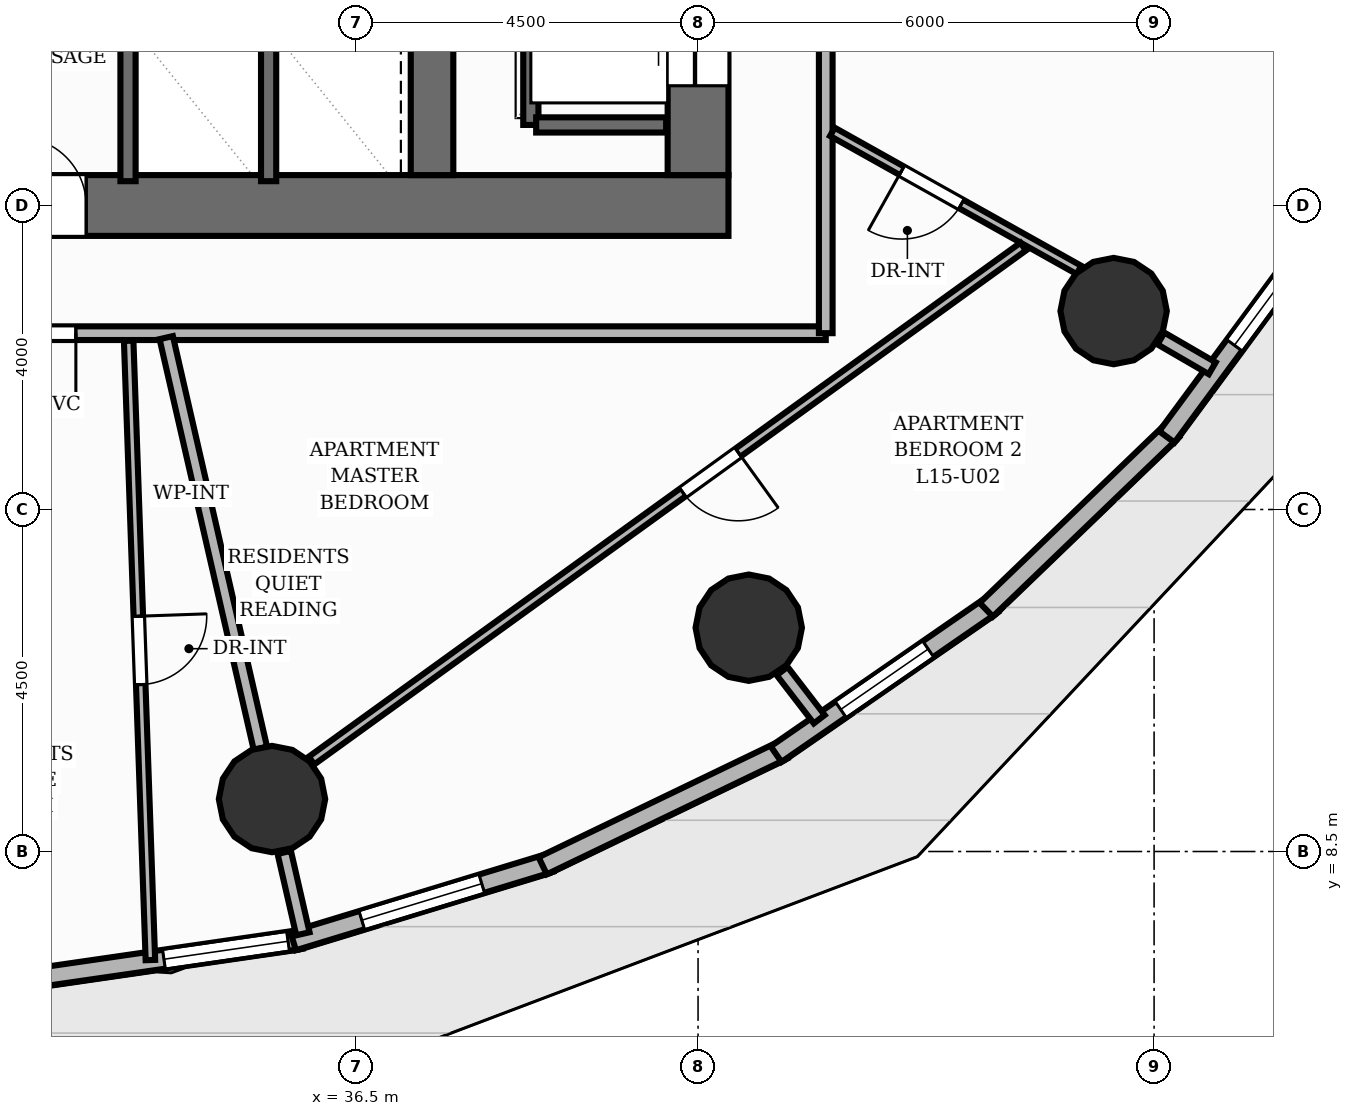
"""IFC4 building model, lengths in metres.
Left out: names, types, materials, properties, quantities, classifications, styles, units other than length and angle.
Written with IfcOpenShell. Run it as: python <this file> out.ifc"""

import sys

from ifc_helpers import new_model, si_unit, direction, frame, frame_2d, origin, origin_2d, place, context, subcontext, project, spatial, rectangle, circle, extrude, element, fill, save


model = new_model("IFC4")
c1 = context("Model", 3, precision=1e-05, world=origin(), true_north=direction((0.0, 1.0)))
c2 = subcontext(c1, "Body", "Model", "MODEL_VIEW")
j1 = project(units=[si_unit("LENGTHUNIT", "METRE"), si_unit("PLANEANGLEUNIT", "RADIAN")], contexts=[c1])
p1 = place(None, origin())
s1 = spatial("IfcSite", under=j1, at=p1, CompositionType="ELEMENT")
p2 = place(p1, origin())
s2 = spatial("IfcBuilding", under=s1, at=p2, CompositionType="ELEMENT")
p3 = place(p2, frame((0.0, 0.0, 53.6)))
s3 = spatial("IfcBuildingStorey", under=s2, at=p3, CompositionType="ELEMENT", Elevation=53.6)
p4 = place(p3, frame((22.6, 17.0, 0.0), z_axis=(0.0, 0.0, 1.0), x_axis=(1.0, 0.0, 0.0)))
e1 = element("IfcWall", 1, at=p4, inside=s3, PredefinedType="SHEAR", context=c2, shape_type="SweptSolid", body=[
    extrude(rectangle(XDim=18.8, YDim=0.8, at=frame_2d((9.4, 0.0))), origin(), (0.0, 0.0, 1.0), 3.2),
])
p5 = place(p4, frame((5.9, 0.0, 0.0)))
e2 = element("IfcOpeningElement", 2, at=p5, cuts=e1, PredefinedType="OPENING", context=c2, shape_type="SweptSolid", body=[
    extrude(rectangle(XDim=1.1, YDim=2.15, at=frame_2d((0.55, 1.075))), frame((0.0, 0.41, 0.0), z_axis=(0.0, -1.0, 0.0), x_axis=(1.0, 0.0, 0.0)), (0.0, 0.0, 1.0), 0.82),
])
p6 = place(p4, frame((9.45, 0.0, 0.0)))
e3 = element("IfcOpeningElement", 3, at=p6, cuts=e1, PredefinedType="OPENING", context=c2, shape_type="SweptSolid", body=[
    extrude(rectangle(XDim=0.9, YDim=2.1, at=frame_2d((0.45, 1.05))), frame((0.0, 0.41, 0.0), z_axis=(0.0, -1.0, 0.0), x_axis=(1.0, 0.0, 0.0)), (0.0, 0.0, 1.0), 0.82),
])
p7 = place(p3, frame((41.0, 17.4, 0.0), z_axis=(0.0, 0.0, 1.0), x_axis=(0.0, 1.0, 0.0)))
e4 = element("IfcWall", 4, at=p7, inside=s3, PredefinedType="SHEAR", context=c2, shape_type="SweptSolid", body=[
    extrude(rectangle(XDim=13.2, YDim=0.8, at=frame_2d((6.6, 0.0))), origin(), (0.0, 0.0, 1.0), 3.2),
])
p8 = place(p7, frame((1.175, 0.0, 0.0)))
e5 = element("IfcOpeningElement", 5, at=p8, cuts=e4, PredefinedType="OPENING", context=c2, shape_type="SweptSolid", body=[
    extrude(rectangle(XDim=1.05, YDim=2.15, at=frame_2d((0.525, 1.075))), frame((0.0, 0.41, 0.0), z_axis=(0.0, -1.0, 0.0), x_axis=(1.0, 0.0, 0.0)), (0.0, 0.0, 1.0), 0.82),
])
p9 = place(p7, frame((4.425, 0.0, 0.0)))
e6 = element("IfcOpeningElement", 6, at=p9, cuts=e4, PredefinedType="OPENING", context=c2, shape_type="SweptSolid", body=[
    extrude(rectangle(XDim=1.05, YDim=2.15, at=frame_2d((0.525, 1.075))), frame((0.0, 0.41, 0.0), z_axis=(0.0, -1.0, 0.0), x_axis=(1.0, 0.0, 0.0)), (0.0, 0.0, 1.0), 0.82),
])
p10 = place(p7, frame((7.725, 0.0, 0.0)))
e7 = element("IfcOpeningElement", 7, at=p10, cuts=e4, PredefinedType="OPENING", context=c2, shape_type="SweptSolid", body=[
    extrude(rectangle(XDim=1.05, YDim=2.15, at=frame_2d((0.525, 1.075))), frame((0.0, 0.41, 0.0), z_axis=(0.0, -1.0, 0.0), x_axis=(1.0, 0.0, 0.0)), (0.0, 0.0, 1.0), 0.82),
])
p11 = place(p7, frame((10.975, 0.0, 0.0)))
e8 = element("IfcOpeningElement", 8, at=p11, cuts=e4, PredefinedType="OPENING", context=c2, shape_type="SweptSolid", body=[
    extrude(rectangle(XDim=1.05, YDim=2.15, at=frame_2d((0.525, 1.075))), frame((0.0, 0.41, 0.0), z_axis=(0.0, -1.0, 0.0), x_axis=(1.0, 0.0, 0.0)), (0.0, 0.0, 1.0), 0.82),
])
p12 = place(p3, frame((37.5, 17.4, 0.0), z_axis=(0.0, 0.0, 1.0), x_axis=(0.0, 1.0, 0.0)))
e9 = element("IfcWall", 9, at=p12, inside=s3, PredefinedType="SHEAR", context=c2, shape_type="SweptSolid", body=[
    extrude(rectangle(XDim=13.2, YDim=0.56, at=frame_2d((6.6, 0.0))), origin(), (0.0, 0.0, 1.0), 3.2),
])
for number, where, z_axis, x_axis in (
    (10, (35.395, 9.19, 0.0), (0.0, 0.0, 1.0), (1.0, 0.0, 0.0)),
    (11, (41.667, 11.445, 0.0), (0.0, 0.0, 1.0), (1.0, 0.0, 0.0)),
    (12, (46.468, 15.611, 0.0), (0.0, 0.0, 1.0), (1.0, 0.0, 0.0)),
):
    element("IfcColumn", number, at=place(p3, frame(where, z_axis=z_axis, x_axis=x_axis)), inside=s3, PredefinedType="COLUMN", context=c2, shape_type="SweptSolid", body=[
        extrude(circle(Radius=0.7, at=origin_2d()), origin(), (0.0, 0.0, 1.0), 3.2),
    ])
p13 = place(p3, frame((35.779, 7.344, 0.0), z_axis=(0.0, 0.0, 1.0), x_axis=(-0.989638017979, -0.143584795051, 0.0)))
e13 = element("IfcWall", 13, at=p13, inside=s3, PredefinedType="SOLIDWALL", context=c2, shape_type="SweptSolid", body=[
    extrude(rectangle(XDim=3.538, YDim=0.25, at=frame_2d((1.769, 0.0))), origin(), (0.0, 0.0, 1.0), 2.96),
])
p14 = place(p13, frame((0.175, 0.0, 0.85)))
e14 = element("IfcOpeningElement", 14, at=p14, cuts=e13, PredefinedType="OPENING", context=c2, shape_type="SweptSolid", body=[
    extrude(rectangle(XDim=1.65, YDim=1.29, at=frame_2d((0.825, 0.645))), frame((0.0, 0.135, 0.0), z_axis=(0.0, -1.0, 0.0), x_axis=(1.0, 0.0, 0.0)), (0.0, 0.0, 1.0), 0.27),
])
p15 = place(p3, frame((39.057, 8.352, 0.0), z_axis=(0.0, 0.0, 1.0), x_axis=(-0.95658107252, -0.291466381759, 0.0)))
e15 = element("IfcWall", 15, at=p15, inside=s3, PredefinedType="SOLIDWALL", context=c2, shape_type="SweptSolid", body=[
    extrude(rectangle(XDim=3.538, YDim=0.25, at=frame_2d((1.769, 0.0))), origin(), (0.0, 0.0, 1.0), 2.96),
])
p16 = place(p15, frame((0.944, 0.0, 0.85)))
e16 = element("IfcOpeningElement", 16, at=p16, cuts=e15, PredefinedType="OPENING", context=c2, shape_type="SweptSolid", body=[
    extrude(rectangle(XDim=1.65, YDim=1.55, at=frame_2d((0.825, 0.775))), frame((0.0, 0.135, 0.0), z_axis=(0.0, -1.0, 0.0), x_axis=(1.0, 0.0, 0.0)), (0.0, 0.0, 1.0), 0.27),
])
p17 = place(p3, frame((42.121, 9.836, 0.0), z_axis=(0.0, 0.0, 1.0), x_axis=(-0.901067057596, -0.433679787073, 0.0)))
e17 = element("IfcWall", 17, at=p17, inside=s3, PredefinedType="SOLIDWALL", context=c2, shape_type="SweptSolid", body=[
    extrude(rectangle(XDim=3.513, YDim=0.25, at=frame_2d((1.756, 0.0))), origin(), (0.0, 0.0, 1.0), 2.96),
])
p18 = place(p3, frame((44.877, 11.751, 0.0), z_axis=(0.0, 0.0, 1.0), x_axis=(-0.822610496702, -0.568605285515, 0.0)))
e18 = element("IfcWall", 18, at=p18, inside=s3, PredefinedType="SOLIDWALL", context=c2, shape_type="SweptSolid", body=[
    extrude(rectangle(XDim=3.465, YDim=0.25, at=frame_2d((1.732, 0.0))), origin(), (0.0, 0.0, 1.0), 2.96),
])
p19 = place(p18, frame((1.032, 0.0, 0.85)))
e19 = element("IfcOpeningElement", 19, at=p19, cuts=e18, PredefinedType="OPENING", context=c2, shape_type="SweptSolid", body=[
    extrude(rectangle(XDim=1.4, YDim=1.29, at=frame_2d((0.7, 0.645))), frame((0.0, 0.135, 0.0), z_axis=(0.0, -1.0, 0.0), x_axis=(1.0, 0.0, 0.0)), (0.0, 0.0, 1.0), 0.27),
])
p20 = place(p3, frame((47.24, 14.039, 0.0), z_axis=(0.0, 0.0, 1.0), x_axis=(-0.720340150583, -0.693620982568, 0.0)))
e20 = element("IfcWall", 20, at=p20, inside=s3, PredefinedType="SOLIDWALL", context=c2, shape_type="SweptSolid", body=[
    extrude(rectangle(XDim=3.399, YDim=0.25, at=frame_2d((1.7, 0.0))), origin(), (0.0, 0.0, 1.0), 2.96),
])
p21 = place(p3, frame((49.14, 16.629, 0.0), z_axis=(0.0, 0.0, 1.0), x_axis=(-0.593762827217, -0.804640109003, 0.0)))
e21 = element("IfcWall", 21, at=p21, inside=s3, PredefinedType="SOLIDWALL", context=c2, shape_type="SweptSolid", body=[
    extrude(rectangle(XDim=3.323, YDim=0.25, at=frame_2d((1.661, 0.0))), origin(), (0.0, 0.0, 1.0), 2.96),
])
p22 = place(p21, frame((0.175, 0.0, 0.85)))
e22 = element("IfcOpeningElement", 22, at=p22, cuts=e21, PredefinedType="OPENING", context=c2, shape_type="SweptSolid", body=[
    extrude(rectangle(XDim=1.65, YDim=1.55, at=frame_2d((0.825, 0.775))), frame((0.0, 0.135, 0.0), z_axis=(0.0, -1.0, 0.0), x_axis=(1.0, 0.0, 0.0)), (0.0, 0.0, 1.0), 0.27),
])
p23 = place(p3, frame((38.8, 18.06, 0.0), z_axis=(0.0, 0.0, 1.0), x_axis=(0.0, 1.0, 0.0)))
e23 = element("IfcWall", 23, at=p23, inside=s3, PredefinedType="SHEAR", context=c2, shape_type="SweptSolid", body=[
    extrude(rectangle(XDim=11.88, YDim=0.2, at=frame_2d((5.94, 0.0))), origin(), (0.0, 0.0, 1.0), 3.2),
])
p24 = place(p3, frame((38.87, 18.06, 0.0), z_axis=(0.0, 0.0, 1.0), x_axis=(1.0, 0.0, 0.0)))
e24 = element("IfcWall", 24, at=p24, inside=s3, PredefinedType="SHEAR", context=c2, shape_type="SweptSolid", body=[
    extrude(rectangle(XDim=1.71, YDim=0.2, at=frame_2d((0.855, 0.0))), origin(), (0.0, 0.0, 1.0), 3.2),
])
for number, where, z_axis, x_axis in (
    (25, (33.5, 17.32, 0.0), (0.0, 0.0, 1.0), (0.0, 1.0, 0.0)),
    (26, (35.35, 17.32, 0.0), (0.0, 0.0, 1.0), (0.0, 1.0, 0.0)),
):
    element("IfcWall", number, at=place(p3, frame(where, z_axis=z_axis, x_axis=x_axis)), inside=s3, PredefinedType="SHEAR", context=c2, shape_type="SweptSolid", body=[
        extrude(rectangle(XDim=1.86, YDim=0.2, at=frame_2d((0.93, 0.0))), origin(), (0.0, 0.0, 1.0), 3.2),
    ])
p25 = place(p3, frame((35.555, 8.488, 0.0), z_axis=(0.0, 0.0, 1.0), x_axis=(0.223512485262, -0.974701066446, 0.0)))
e27 = element("IfcWall", 27, at=p25, inside=s3, PredefinedType="PARTITIONING", context=c2, shape_type="SweptSolid", body=[
    extrude(rectangle(XDim=1.099, YDim=0.18, at=frame_2d((0.549, 0.0))), origin(), (0.0, 0.0, 1.0), 2.178),
])
p26 = place(p3, frame((42.106, 10.874, 0.0), z_axis=(0.0, 0.0, 1.0), x_axis=(0.609961416057, -0.792431114307, 0.0)))
e28 = element("IfcWall", 28, at=p26, inside=s3, PredefinedType="PARTITIONING", context=c2, shape_type="SweptSolid", body=[
    extrude(rectangle(XDim=0.8, YDim=0.18, at=frame_2d((0.4, 0.0))), origin(), (0.0, 0.0, 1.0), 2.178),
])
p27 = place(p3, frame((47.091, 15.25, 0.0), z_axis=(0.0, 0.0, 1.0), x_axis=(0.86504748832, -0.501689986895, 0.0)))
e29 = element("IfcWall", 29, at=p27, inside=s3, PredefinedType="PARTITIONING", context=c2, shape_type="SweptSolid", body=[
    extrude(rectangle(XDim=0.78, YDim=0.18, at=frame_2d((0.39, 0.0))), origin(), (0.0, 0.0, 1.0), 2.178),
])
p28 = place(p3, frame((42.68, 15.32, 0.0), z_axis=(0.0, 0.0, 1.0), x_axis=(-1.0, 0.0, 0.0)))
e30 = element("IfcWall", 30, at=p28, inside=s3, PredefinedType="PARTITIONING", context=c2, shape_type="SweptSolid", body=[
    extrude(rectangle(XDim=13.87, YDim=0.18, at=frame_2d((6.935, 0.0))), origin(), (0.0, 0.0, 1.0), 2.955),
])
p29 = place(p28, frame((9.866, 0.0, 0.0)))
e31 = element("IfcOpeningElement", 31, at=p29, cuts=e30, PredefinedType="OPENING", context=c2, shape_type="SweptSolid", body=[
    extrude(rectangle(XDim=0.9, YDim=2.1, at=frame_2d((0.45, 1.05))), frame((0.0, 0.1, 0.0), z_axis=(0.0, -1.0, 0.0), x_axis=(1.0, 0.0, 0.0)), (0.0, 0.0, 1.0), 0.2),
])
p30 = place(p3, frame((42.68, 30.109, 0.0), z_axis=(0.0, 0.0, 1.0), x_axis=(0.0, -1.0, 0.0)))
e32 = element("IfcWall", 32, at=p30, inside=s3, PredefinedType="PARTITIONING", context=c2, shape_type="SweptSolid", body=[
    extrude(rectangle(XDim=14.789, YDim=0.18, at=frame_2d((7.395, 0.0))), origin(), (0.0, 0.0, 1.0), 2.955),
])
p31 = place(p30, frame((9.4, 0.0, 0.0)))
e33 = element("IfcOpeningElement", 33, at=p31, cuts=e32, PredefinedType="OPENING", context=c2, shape_type="SweptSolid", body=[
    extrude(rectangle(XDim=1.05, YDim=2.15, at=frame_2d((0.525, 1.075))), frame((0.0, 0.1, 0.0), z_axis=(0.0, -1.0, 0.0), x_axis=(1.0, 0.0, 0.0)), (0.0, 0.0, 1.0), 0.2),
])
p32 = place(p3, frame((33.509, 15.22, 0.0), z_axis=(0.0, 0.0, 1.0), x_axis=(0.035033610305, -0.999386134659, 0.0)))
e34 = element("IfcWall", 34, at=p32, inside=s3, PredefinedType="PARTITIONING", context=c2, shape_type="SweptSolid", body=[
    extrude(rectangle(XDim=8.154, YDim=0.125, at=frame_2d((4.077, 0.0))), origin(), (0.0, 0.0, 1.0), 2.955),
])
p33 = place(p32, frame((3.627, 0.0, 0.0)))
e35 = element("IfcOpeningElement", 35, at=p33, cuts=e34, PredefinedType="OPENING", context=c2, shape_type="SweptSolid", body=[
    extrude(rectangle(XDim=0.9, YDim=2.1, at=frame_2d((0.45, 1.05))), frame((0.0, 0.073, 0.0), z_axis=(0.0, -1.0, 0.0), x_axis=(1.0, 0.0, 0.0)), (0.0, 0.0, 1.0), 0.145),
])
p34 = place(p3, frame((34.003, 15.261, 0.0), z_axis=(0.0, 0.0, 1.0), x_axis=(0.22340578764, -0.974725527546, 0.0)))
e36 = element("IfcWall", 36, at=p34, inside=s3, PredefinedType="PARTITIONING", context=c2, shape_type="SweptSolid", body=[
    extrude(rectangle(XDim=5.545, YDim=0.18, at=frame_2d((2.772, 0.0))), origin(), (0.0, 0.0, 1.0), 2.178),
])
p35 = place(p3, frame((46.011, 16.152, 0.0), z_axis=(0.0, 0.0, 1.0), x_axis=(-0.872501537555, 0.488611365978, 0.0)))
e37 = element("IfcWall", 37, at=p35, inside=s3, PredefinedType="PARTITIONING", context=c2, shape_type="SweptSolid", body=[
    extrude(rectangle(XDim=3.719, YDim=0.125, at=frame_2d((1.859, 0.0))), origin(), (0.0, 0.0, 1.0), 2.178),
])
p36 = place(p35, frame((1.773, 0.0, 0.0)))
e38 = element("IfcOpeningElement", 38, at=p36, cuts=e37, PredefinedType="OPENING", context=c2, shape_type="SweptSolid", body=[
    extrude(rectangle(XDim=0.9, YDim=2.1, at=frame_2d((0.45, 1.05))), frame((0.0, 0.073, 0.0), z_axis=(0.0, -1.0, 0.0), x_axis=(1.0, 0.0, 0.0)), (0.0, 0.0, 1.0), 0.145),
])
p37 = place(p3, frame((45.278, 16.459, 0.0), z_axis=(0.0, 0.0, 1.0), x_axis=(-0.810668637761, -0.585505217526, 0.0)))
e39 = element("IfcWall", 39, at=p37, inside=s3, PredefinedType="PARTITIONING", context=c2, shape_type="SweptSolid", body=[
    extrude(rectangle(XDim=11.55, YDim=0.125, at=frame_2d((5.775, 0.0))), origin(), (0.0, 0.0, 1.0), 2.955),
])
p38 = place(p37, frame((4.625, 0.0, 0.0)))
e40 = element("IfcOpeningElement", 40, at=p38, cuts=e39, PredefinedType="OPENING", context=c2, shape_type="SweptSolid", body=[
    extrude(rectangle(XDim=0.9, YDim=2.1, at=frame_2d((0.45, 1.05))), frame((0.0, 0.073, 0.0), z_axis=(0.0, -1.0, 0.0), x_axis=(1.0, 0.0, 0.0)), (0.0, 0.0, 1.0), 0.145),
])
p39 = place(p14, origin())
e41 = element("IfcWindow", 41, at=p39, inside=s3, PartitioningType="SINGLE_PANEL", PredefinedType="WINDOW", context=c2, shape_type="SweptSolid", body=[
    extrude(rectangle(XDim=1.65, YDim=1.29, at=frame_2d((0.825, 0.645))), frame((0.0, 0.03, 0.0), z_axis=(0.0, -1.0, 0.0), x_axis=(1.0, 0.0, 0.0)), (0.0, 0.0, 1.0), 0.06),
])
fill(e14, e41)
p40 = place(p16, origin())
e42 = element("IfcWindow", 42, at=p40, inside=s3, PartitioningType="SINGLE_PANEL", PredefinedType="WINDOW", context=c2, shape_type="SweptSolid", body=[
    extrude(rectangle(XDim=1.65, YDim=1.55, at=frame_2d((0.825, 0.775))), frame((0.0, 0.03, 0.0), z_axis=(0.0, -1.0, 0.0), x_axis=(1.0, 0.0, 0.0)), (0.0, 0.0, 1.0), 0.06),
])
fill(e16, e42)
p41 = place(p19, origin())
e43 = element("IfcWindow", 43, at=p41, inside=s3, PartitioningType="SINGLE_PANEL", PredefinedType="WINDOW", context=c2, shape_type="SweptSolid", body=[
    extrude(rectangle(XDim=1.4, YDim=1.29, at=frame_2d((0.7, 0.645))), frame((0.0, 0.03, 0.0), z_axis=(0.0, -1.0, 0.0), x_axis=(1.0, 0.0, 0.0)), (0.0, 0.0, 1.0), 0.06),
])
fill(e19, e43)
p42 = place(p22, origin())
e44 = element("IfcWindow", 44, at=p42, inside=s3, PartitioningType="SINGLE_PANEL", PredefinedType="WINDOW", context=c2, shape_type="SweptSolid", body=[
    extrude(rectangle(XDim=1.65, YDim=1.55, at=frame_2d((0.825, 0.775))), frame((0.0, 0.03, 0.0), z_axis=(0.0, -1.0, 0.0), x_axis=(1.0, 0.0, 0.0)), (0.0, 0.0, 1.0), 0.06),
])
fill(e22, e44)
p43 = place(p8, origin())
e45 = element("IfcDoor", 45, at=p43, inside=s3, OperationType="DOUBLE_DOOR_SLIDING", PredefinedType="DOOR", context=c2, shape_type="SweptSolid", body=[
    extrude(rectangle(XDim=1.05, YDim=2.15, at=frame_2d((0.525, 1.075))), frame((0.0, 0.025, 0.0), z_axis=(0.0, -1.0, 0.0), x_axis=(1.0, 0.0, 0.0)), (0.0, 0.0, 1.0), 0.05),
])
fill(e5, e45)
p44 = place(p6, origin())
e46 = element("IfcDoor", 46, at=p44, inside=s3, OperationType="SINGLE_SWING_LEFT", PredefinedType="DOOR", context=c2, shape_type="SweptSolid", body=[
    extrude(rectangle(XDim=0.9, YDim=2.1, at=frame_2d((0.45, 1.05))), frame((0.0, 0.025, 0.0), z_axis=(0.0, -1.0, 0.0), x_axis=(1.0, 0.0, 0.0)), (0.0, 0.0, 1.0), 0.05),
])
fill(e3, e46)
p45 = place(p29, origin())
e47 = element("IfcDoor", 47, at=p45, inside=s3, OperationType="SINGLE_SWING_LEFT", PredefinedType="DOOR", context=c2, shape_type="SweptSolid", body=[
    extrude(rectangle(XDim=0.9, YDim=2.1, at=frame_2d((0.45, 1.05))), frame((0.0, 0.025, 0.0), z_axis=(0.0, -1.0, 0.0), x_axis=(1.0, 0.0, 0.0)), (0.0, 0.0, 1.0), 0.05),
])
fill(e31, e47)
p46 = place(p33, origin())
e48 = element("IfcDoor", 48, at=p46, inside=s3, OperationType="SINGLE_SWING_LEFT", PredefinedType="DOOR", context=c2, shape_type="SweptSolid", body=[
    extrude(rectangle(XDim=0.9, YDim=2.1, at=frame_2d((0.45, 1.05))), frame((0.0, 0.025, 0.0), z_axis=(0.0, -1.0, 0.0), x_axis=(1.0, 0.0, 0.0)), (0.0, 0.0, 1.0), 0.05),
])
fill(e35, e48)
p47 = place(p36, origin())
e49 = element("IfcDoor", 49, at=p47, inside=s3, OperationType="SINGLE_SWING_RIGHT", PredefinedType="DOOR", context=c2, shape_type="SweptSolid", body=[
    extrude(rectangle(XDim=0.9, YDim=2.1, at=frame_2d((0.45, 1.05))), frame((0.0, 0.025, 0.0), z_axis=(0.0, -1.0, 0.0), x_axis=(1.0, 0.0, 0.0)), (0.0, 0.0, 1.0), 0.05),
])
fill(e38, e49)
p48 = place(p38, origin())
e50 = element("IfcDoor", 50, at=p48, inside=s3, OperationType="SINGLE_SWING_LEFT", PredefinedType="DOOR", context=c2, shape_type="SweptSolid", body=[
    extrude(rectangle(XDim=0.9, YDim=2.1, at=frame_2d((0.45, 1.05))), frame((0.0, 0.025, 0.0), z_axis=(0.0, -1.0, 0.0), x_axis=(1.0, 0.0, 0.0)), (0.0, 0.0, 1.0), 0.05),
])
fill(e40, e50)
save(model, sys.argv[1])
